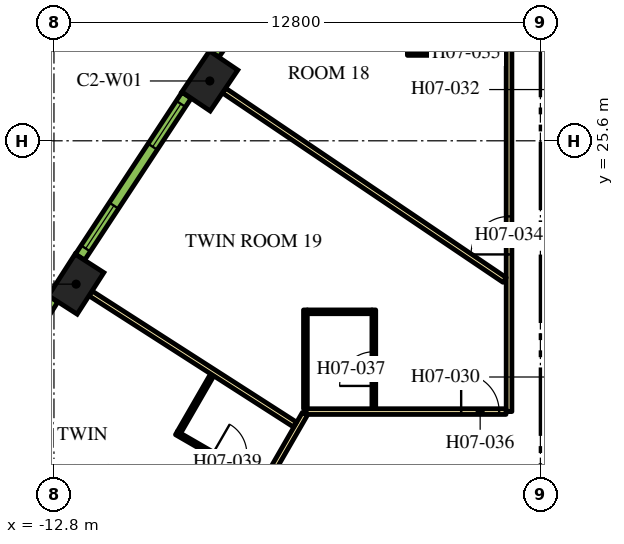
"""IFC4 building model, lengths in metres.
Left out: names, types, materials, properties, quantities, classifications, styles, units other than length and angle.
Written with IfcOpenShell. Run it as: python <this file> out.ifc"""

import sys

from ifc_helpers import new_model, si_unit, direction, frame, frame_2d, origin, origin_2d, place, context, subcontext, project, spatial, rectangle, extrude, element, fill, save


model = new_model("IFC4")
c1 = context("Model", 3, precision=1e-05, world=origin(), true_north=direction((0.0, 1.0)))
c2 = subcontext(c1, "Body", "Model", "MODEL_VIEW")
j1 = project(units=[si_unit("LENGTHUNIT", "METRE"), si_unit("PLANEANGLEUNIT", "RADIAN")], contexts=[c1])
p1 = place(None, origin())
s1 = spatial("IfcSite", under=j1, at=p1, CompositionType="ELEMENT")
p2 = place(p1, origin())
s2 = spatial("IfcBuilding", under=s1, at=p2, CompositionType="ELEMENT")
p3 = place(p2, frame((0.0, 0.0, 99.3)))
s3 = spatial("IfcBuildingStorey", under=s2, at=p3, CompositionType="ELEMENT", Elevation=99.3)
for number, where, z_axis, x_axis in (
    (1, (-8.699, 27.174, 0.0), (0.0, 0.0, 1.0), (-0.559, -0.829, 0.0)),
    (2, (-12.217, 21.828, 0.0), (0.0, 0.0, 1.0), (-0.54, -0.842, 0.0)),
):
    element("IfcColumn", number, at=place(p3, frame(where, z_axis=z_axis, x_axis=x_axis)), inside=s3, PredefinedType="COLUMN", context=c2, shape_type="SweptSolid", body=[
        extrude(rectangle(XDim=1.3, YDim=0.9, at=origin_2d()), origin(), (0.0, 0.0, 1.0), 3.9),
    ])
p4 = place(p3, frame((-0.825, 18.475, 0.0), z_axis=(0.0, 0.0, 1.0), x_axis=(0.0, 1.0, 0.0)))
e3 = element("IfcWall", 3, at=p4, inside=s3, PredefinedType="PARTITIONING", context=c2, shape_type="SweptSolid", body=[
    extrude(rectangle(XDim=13.623, YDim=0.15, at=frame_2d((6.812, 0.0))), origin(), (0.0, 0.0, 1.0), 2.75),
])
p5 = place(p4, frame((4.135, 0.0, 0.0)))
e4 = element("IfcOpeningElement", 4, at=p5, cuts=e3, PredefinedType="OPENING", context=c2, shape_type="SweptSolid", body=[
    extrude(rectangle(XDim=1.0, YDim=2.1, at=frame_2d((0.5, 1.05))), frame((0.0, 0.085, 0.0), z_axis=(0.0, -1.0, 0.0), x_axis=(1.0, 0.0, 0.0)), (0.0, 0.0, 1.0), 0.17),
])
p6 = place(p3, frame((-6.163, 18.475, 0.0), z_axis=(0.0, 0.0, 1.0), x_axis=(1.0, 0.0, 0.0)))
e5 = element("IfcWall", 5, at=p6, inside=s3, PredefinedType="PARTITIONING", context=c2, shape_type="SweptSolid", body=[
    extrude(rectangle(XDim=5.258, YDim=0.15, at=frame_2d((2.629, 0.0))), origin(), (0.0, 0.0, 1.0), 2.75),
])
p7 = place(p6, frame((4.078, 0.0, 0.0)))
e6 = element("IfcOpeningElement", 6, at=p7, cuts=e5, PredefinedType="OPENING", context=c2, shape_type="SweptSolid", body=[
    extrude(rectangle(XDim=1.0, YDim=2.1, at=frame_2d((0.5, 1.05))), frame((0.0, 0.085, 0.0), z_axis=(0.0, -1.0, 0.0), x_axis=(1.0, 0.0, 0.0)), (0.0, 0.0, 1.0), 0.17),
])
p8 = place(p3, frame((-19.081, -3.9, 0.0), z_axis=(0.0, 0.0, 1.0), x_axis=(0.499998313975, 0.866026377209, 0.0)))
e7 = element("IfcWall", 7, at=p8, inside=s3, PredefinedType="PARTITIONING", context=c2, shape_type="SweptSolid", body=[
    extrude(rectangle(XDim=25.766, YDim=0.15, at=frame_2d((12.883, 0.0))), origin(), (0.0, 0.0, 1.0), 2.75),
])
p9 = place(p8, frame((19.306, 0.0, 0.0)))
e8 = element("IfcOpeningElement", 8, at=p9, cuts=e7, PredefinedType="OPENING", context=c2, shape_type="SweptSolid", body=[
    extrude(rectangle(XDim=1.0, YDim=2.1, at=frame_2d((0.5, 1.05))), frame((0.0, 0.085, 0.0), z_axis=(0.0, -1.0, 0.0), x_axis=(1.0, 0.0, 0.0)), (0.0, 0.0, 1.0), 0.17),
])
p10 = place(p8, frame((17.144, 0.0, 0.0)))
e9 = element("IfcOpeningElement", 9, at=p10, cuts=e7, PredefinedType="OPENING", context=c2, shape_type="SweptSolid", body=[
    extrude(rectangle(XDim=0.9, YDim=2.1, at=frame_2d((0.45, 1.05))), frame((0.0, 0.085, 0.0), z_axis=(0.0, -1.0, 0.0), x_axis=(1.0, 0.0, 0.0)), (0.0, 0.0, 1.0), 0.17),
])
p11 = place(p8, frame((9.955, 0.0, 0.0)))
e10 = element("IfcOpeningElement", 10, at=p11, cuts=e7, PredefinedType="OPENING", context=c2, shape_type="SweptSolid", body=[
    extrude(rectangle(XDim=1.1, YDim=2.1, at=frame_2d((0.55, 1.05))), frame((0.0, 0.085, 0.0), z_axis=(0.0, -1.0, 0.0), x_axis=(1.0, 0.0, 0.0)), (0.0, 0.0, 1.0), 0.17),
])
p12 = place(p8, frame((8.648, 0.0, 0.0)))
e11 = element("IfcOpeningElement", 11, at=p12, cuts=e7, PredefinedType="OPENING", context=c2, shape_type="SweptSolid", body=[
    extrude(rectangle(XDim=1.0, YDim=2.1, at=frame_2d((0.5, 1.05))), frame((0.0, 0.085, 0.0), z_axis=(0.0, -1.0, 0.0), x_axis=(1.0, 0.0, 0.0)), (0.0, 0.0, 1.0), 0.17),
])
p13 = place(p8, frame((1.553, 0.0, 0.0)))
e12 = element("IfcOpeningElement", 12, at=p13, cuts=e7, PredefinedType="OPENING", context=c2, shape_type="SweptSolid", body=[
    extrude(rectangle(XDim=0.9, YDim=2.1, at=frame_2d((0.45, 1.05))), frame((0.0, 0.085, 0.0), z_axis=(0.0, -1.0, 0.0), x_axis=(1.0, 0.0, 0.0)), (0.0, 0.0, 1.0), 0.17),
])
p14 = place(p3, frame((-11.838, 21.585, 0.0), z_axis=(0.0, 0.0, 1.0), x_axis=(0.841699322813, -0.539946525108, 0.0)))
e13 = element("IfcWall", 13, at=p14, inside=s3, PredefinedType="PARTITIONING", context=c2, shape_type="SweptSolid", body=[
    extrude(rectangle(XDim=6.392, YDim=0.15, at=frame_2d((3.196, 0.0))), origin(), (0.0, 0.0, 1.0), 2.75),
])
p15 = place(p3, frame((-8.326, 26.923, 0.0), z_axis=(0.0, 0.0, 1.0), x_axis=(0.828836601893, -0.5594907393, 0.0)))
e14 = element("IfcWall", 14, at=p15, inside=s3, PredefinedType="PARTITIONING", context=c2, shape_type="SweptSolid", body=[
    extrude(rectangle(XDim=8.909, YDim=0.15, at=frame_2d((4.455, 0.0))), origin(), (0.0, 0.0, 1.0), 2.75),
])
p16 = place(p3, frame((-3.5, 27.898, 0.0), z_axis=(0.0, 0.0, 1.0), x_axis=(1.0, 0.0, 0.0)))
e15 = element("IfcWall", 15, at=p16, inside=s3, PredefinedType="PARTITIONING", context=c2, shape_type="SweptSolid", body=[
    extrude(rectangle(XDim=2.6, YDim=0.1, at=frame_2d((1.3, 0.0))), origin(), (0.0, 0.0, 1.0), 2.75),
])
p17 = place(p16, frame((1.1, 0.0, 0.0)))
e16 = element("IfcOpeningElement", 16, at=p17, cuts=e15, PredefinedType="OPENING", context=c2, shape_type="SweptSolid", body=[
    extrude(rectangle(XDim=0.9, YDim=2.1, at=frame_2d((0.45, 1.05))), frame((0.0, 0.06, 0.0), z_axis=(0.0, -1.0, 0.0), x_axis=(1.0, 0.0, 0.0)), (0.0, 0.0, 1.0), 0.12),
])
p18 = place(p3, frame((-4.383, 18.55, 0.0), z_axis=(0.0, 0.0, 1.0), x_axis=(0.0, 1.0, 0.0)))
e17 = element("IfcWall", 17, at=p18, inside=s3, PredefinedType="PARTITIONING", context=c2, shape_type="SweptSolid", body=[
    extrude(rectangle(XDim=2.6, YDim=0.1, at=frame_2d((1.3, 0.0))), origin(), (0.0, 0.0, 1.0), 2.75),
])
p19 = place(p18, frame((0.6, 0.0, 0.0)))
e18 = element("IfcOpeningElement", 18, at=p19, cuts=e17, PredefinedType="OPENING", context=c2, shape_type="SweptSolid", body=[
    extrude(rectangle(XDim=0.9, YDim=2.1, at=frame_2d((0.45, 1.05))), frame((0.0, 0.06, 0.0), z_axis=(0.0, -1.0, 0.0), x_axis=(1.0, 0.0, 0.0)), (0.0, 0.0, 1.0), 0.12),
])
p20 = place(p3, frame((-4.433, 21.1, 0.0), z_axis=(0.0, 0.0, 1.0), x_axis=(-1.0, 0.0, 0.0)))
e19 = element("IfcWall", 19, at=p20, inside=s3, PredefinedType="PARTITIONING", context=c2, shape_type="SweptSolid", body=[
    extrude(rectangle(XDim=1.7, YDim=0.1, at=frame_2d((0.85, 0.0))), origin(), (0.0, 0.0, 1.0), 2.75),
])
p21 = place(p3, frame((-6.183, 18.55, 0.0), z_axis=(0.0, 0.0, 1.0), x_axis=(0.0, 1.0, 0.0)))
e20 = element("IfcWall", 20, at=p21, inside=s3, PredefinedType="PARTITIONING", context=c2, shape_type="SweptSolid", body=[
    extrude(rectangle(XDim=2.6, YDim=0.1, at=frame_2d((1.3, 0.0))), origin(), (0.0, 0.0, 1.0), 2.75),
])
p22 = place(p3, frame((-9.578, 17.911, 0.0), z_axis=(0.0, 0.0, 1.0), x_axis=(0.866021400173, -0.500006934395, 0.0)))
e21 = element("IfcWall", 21, at=p22, inside=s3, PredefinedType="PARTITIONING", context=c2, shape_type="SweptSolid", body=[
    extrude(rectangle(XDim=2.6, YDim=0.1, at=frame_2d((1.3, 0.0))), origin(), (0.0, 0.0, 1.0), 2.75),
])
p23 = place(p22, frame((1.1, 0.0, 0.0)))
e22 = element("IfcOpeningElement", 22, at=p23, cuts=e21, PredefinedType="OPENING", context=c2, shape_type="SweptSolid", body=[
    extrude(rectangle(XDim=0.9, YDim=2.1, at=frame_2d((0.45, 1.05))), frame((0.0, 0.06, 0.0), z_axis=(0.0, -1.0, 0.0), x_axis=(1.0, 0.0, 0.0)), (0.0, 0.0, 1.0), 0.12),
])
p24 = place(p3, frame((-9.51, 17.929, 0.0), z_axis=(0.0, 0.0, 1.0), x_axis=(0.500062521093, 0.865989304205, 0.0)))
e23 = element("IfcWall", 23, at=p24, inside=s3, PredefinedType="PARTITIONING", context=c2, shape_type="SweptSolid", body=[
    extrude(rectangle(XDim=1.74, YDim=0.1, at=frame_2d((0.87, 0.0))), origin(), (0.0, 0.0, 1.0), 2.75),
])
p25 = place(p3, frame((-5.673, 32.081, 0.0), z_axis=(0.0, 0.0, 1.0), x_axis=(-0.569113019126, -0.822259309136, 0.0)))
e24 = element("IfcWall", 24, at=p25, inside=s3, PredefinedType="SOLIDWALL", context=c2, shape_type="SweptSolid", body=[
    extrude(rectangle(XDim=5.107, YDim=0.29, at=frame_2d((2.553, 0.0))), origin(), (0.0, 0.0, 1.0), 3.65),
])
p26 = place(p25, frame((0.24, 0.0, 0.9)))
e25 = element("IfcOpeningElement", 25, at=p26, cuts=e24, PredefinedType="OPENING", context=c2, shape_type="SweptSolid", body=[
    extrude(rectangle(XDim=1.35, YDim=2.15, at=frame_2d((0.675, 1.075))), frame((0.0, 0.155, 0.0), z_axis=(0.0, -1.0, 0.0), x_axis=(1.0, 0.0, 0.0)), (0.0, 0.0, 1.0), 0.31),
])
p27 = place(p25, frame((3.471, 0.0, 0.9)))
e26 = element("IfcOpeningElement", 26, at=p27, cuts=e24, PredefinedType="OPENING", context=c2, shape_type="SweptSolid", body=[
    extrude(rectangle(XDim=1.35, YDim=2.15, at=frame_2d((0.675, 1.075))), frame((0.0, 0.155, 0.0), z_axis=(0.0, -1.0, 0.0), x_axis=(1.0, 0.0, 0.0)), (0.0, 0.0, 1.0), 0.31),
])
p28 = place(p3, frame((-9.311, 26.799, 0.0), z_axis=(0.0, 0.0, 1.0), x_axis=(-0.549741341923, -0.835334937005, 0.0)))
e27 = element("IfcWall", 27, at=p28, inside=s3, PredefinedType="SOLIDWALL", context=c2, shape_type="SweptSolid", body=[
    extrude(rectangle(XDim=5.1, YDim=0.29, at=frame_2d((2.55, 0.0))), origin(), (0.0, 0.0, 1.0), 3.65),
])
p29 = place(p28, frame((0.273, 0.0, 0.9)))
e28 = element("IfcOpeningElement", 28, at=p29, cuts=e27, PredefinedType="OPENING", context=c2, shape_type="SweptSolid", body=[
    extrude(rectangle(XDim=1.35, YDim=2.15, at=frame_2d((0.675, 1.075))), frame((0.0, 0.155, 0.0), z_axis=(0.0, -1.0, 0.0), x_axis=(1.0, 0.0, 0.0)), (0.0, 0.0, 1.0), 0.31),
])
p30 = place(p28, frame((3.478, 0.0, 0.9)))
e29 = element("IfcOpeningElement", 29, at=p30, cuts=e27, PredefinedType="OPENING", context=c2, shape_type="SweptSolid", body=[
    extrude(rectangle(XDim=1.35, YDim=2.15, at=frame_2d((0.675, 1.075))), frame((0.0, 0.155, 0.0), z_axis=(0.0, -1.0, 0.0), x_axis=(1.0, 0.0, 0.0)), (0.0, 0.0, 1.0), 0.31),
])
p31 = place(p3, frame((-12.82, 21.439, 0.0), z_axis=(0.0, 0.0, 1.0), x_axis=(-0.530072082134, -0.847952585787, 0.0)))
e30 = element("IfcWall", 30, at=p31, inside=s3, PredefinedType="SOLIDWALL", context=c2, shape_type="SweptSolid", body=[
    extrude(rectangle(XDim=5.1, YDim=0.29, at=frame_2d((2.55, 0.0))), origin(), (0.0, 0.0, 1.0), 3.65),
])
p32 = place(p31, frame((0.273, 0.0, 0.9)))
e31 = element("IfcOpeningElement", 31, at=p32, cuts=e30, PredefinedType="OPENING", context=c2, shape_type="SweptSolid", body=[
    extrude(rectangle(XDim=1.35, YDim=2.15, at=frame_2d((0.675, 1.075))), frame((0.0, 0.155, 0.0), z_axis=(0.0, -1.0, 0.0), x_axis=(1.0, 0.0, 0.0)), (0.0, 0.0, 1.0), 0.31),
])
p33 = place(p31, frame((3.478, 0.0, 0.9)))
e32 = element("IfcOpeningElement", 32, at=p33, cuts=e30, PredefinedType="OPENING", context=c2, shape_type="SweptSolid", body=[
    extrude(rectangle(XDim=1.35, YDim=2.15, at=frame_2d((0.675, 1.075))), frame((0.0, 0.155, 0.0), z_axis=(0.0, -1.0, 0.0), x_axis=(1.0, 0.0, 0.0)), (0.0, 0.0, 1.0), 0.31),
])
p34 = place(p5, origin())
e33 = element("IfcDoor", 33, at=p34, inside=s3, OperationType="SINGLE_SWING_LEFT", PredefinedType="DOOR", context=c2, shape_type="SweptSolid", body=[
    extrude(rectangle(XDim=1.0, YDim=2.1, at=frame_2d((0.5, 1.05))), frame((0.0, 0.025, 0.0), z_axis=(0.0, -1.0, 0.0), x_axis=(1.0, 0.0, 0.0)), (0.0, 0.0, 1.0), 0.05),
])
fill(e4, e33)
p35 = place(p17, origin())
e34 = element("IfcDoor", 34, at=p35, inside=s3, OperationType="SINGLE_SWING_RIGHT", PredefinedType="DOOR", context=c2, shape_type="SweptSolid", body=[
    extrude(rectangle(XDim=0.9, YDim=2.1, at=frame_2d((0.45, 1.05))), frame((0.0, 0.025, 0.0), z_axis=(0.0, -1.0, 0.0), x_axis=(1.0, 0.0, 0.0)), (0.0, 0.0, 1.0), 0.05),
])
fill(e16, e34)
p36 = place(p7, origin())
e35 = element("IfcDoor", 35, at=p36, inside=s3, OperationType="SINGLE_SWING_RIGHT", PredefinedType="DOOR", context=c2, shape_type="SweptSolid", body=[
    extrude(rectangle(XDim=1.0, YDim=2.1, at=frame_2d((0.5, 1.05))), frame((0.0, 0.025, 0.0), z_axis=(0.0, -1.0, 0.0), x_axis=(1.0, 0.0, 0.0)), (0.0, 0.0, 1.0), 0.05),
])
fill(e6, e35)
p37 = place(p19, origin())
e36 = element("IfcDoor", 36, at=p37, inside=s3, OperationType="SINGLE_SWING_LEFT", PredefinedType="DOOR", context=c2, shape_type="SweptSolid", body=[
    extrude(rectangle(XDim=0.9, YDim=2.1, at=frame_2d((0.45, 1.05))), frame((0.0, 0.025, 0.0), z_axis=(0.0, -1.0, 0.0), x_axis=(1.0, 0.0, 0.0)), (0.0, 0.0, 1.0), 0.05),
])
fill(e18, e36)
p38 = place(p23, origin())
e37 = element("IfcDoor", 37, at=p38, inside=s3, OperationType="SINGLE_SWING_LEFT", PredefinedType="DOOR", context=c2, shape_type="SweptSolid", body=[
    extrude(rectangle(XDim=0.9, YDim=2.1, at=frame_2d((0.45, 1.05))), frame((0.0, 0.025, 0.0), z_axis=(0.0, -1.0, 0.0), x_axis=(1.0, 0.0, 0.0)), (0.0, 0.0, 1.0), 0.05),
])
fill(e22, e37)
p39 = place(p29, origin())
e38 = element("IfcWindow", 38, at=p39, inside=s3, PartitioningType="DOUBLE_PANEL_VERTICAL", PredefinedType="WINDOW", context=c2, shape_type="SweptSolid", body=[
    extrude(rectangle(XDim=1.35, YDim=2.15, at=frame_2d((0.675, 1.075))), frame((0.0, 0.015, 0.0), z_axis=(0.0, -1.0, 0.0), x_axis=(1.0, 0.0, 0.0)), (0.0, 0.0, 1.0), 0.06),
])
fill(e28, e38)
p40 = place(p30, origin())
e39 = element("IfcWindow", 39, at=p40, inside=s3, PartitioningType="DOUBLE_PANEL_VERTICAL", PredefinedType="WINDOW", context=c2, shape_type="SweptSolid", body=[
    extrude(rectangle(XDim=1.35, YDim=2.15, at=frame_2d((0.675, 1.075))), frame((0.0, 0.015, 0.0), z_axis=(0.0, -1.0, 0.0), x_axis=(1.0, 0.0, 0.0)), (0.0, 0.0, 1.0), 0.06),
])
fill(e29, e39)
save(model, sys.argv[1])
